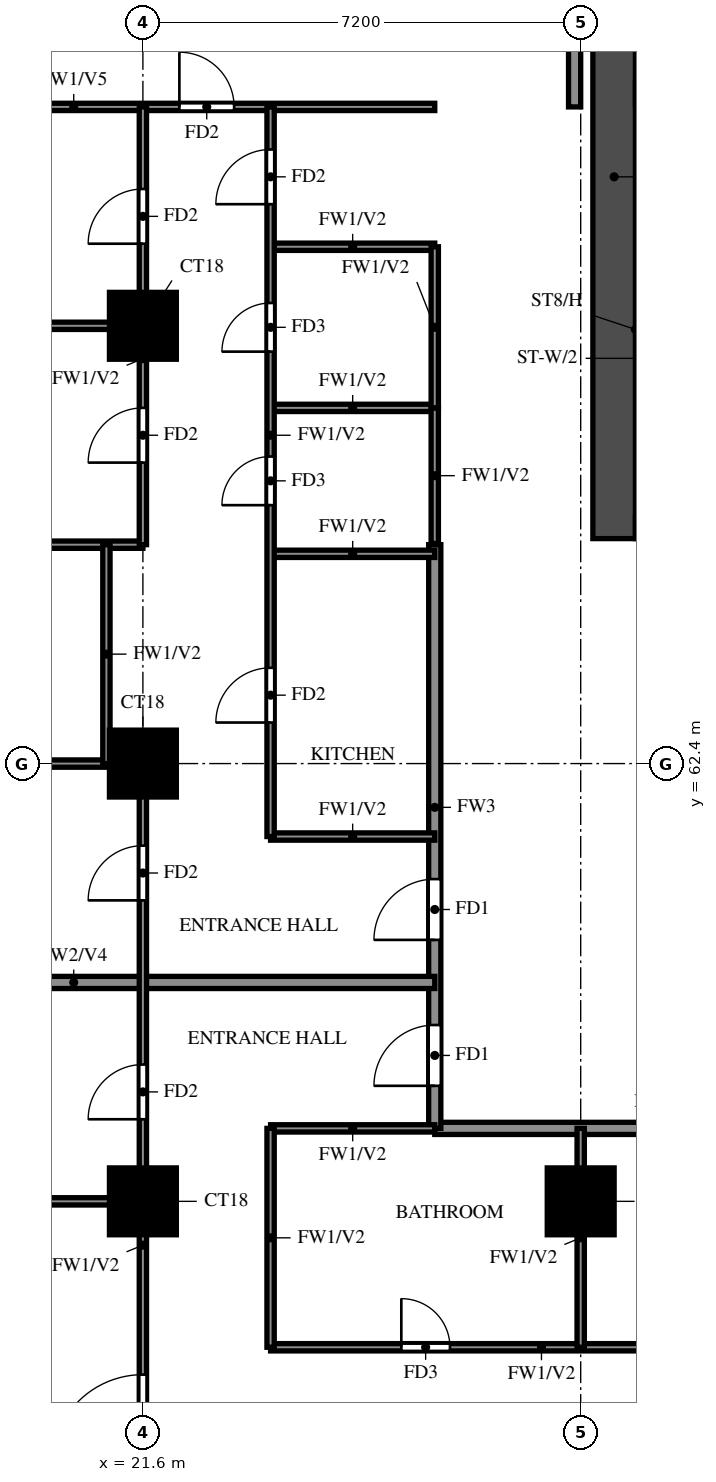
"""IFC4 building model, lengths in metres.
Left out: names, types, materials, properties, quantities, classifications, styles, units other than length and angle.
Written with IfcOpenShell. Run it as: python <this file> out.ifc"""

import sys

from ifc_helpers import new_model, si_unit, direction, frame, frame_2d, origin, origin_2d, place, context, subcontext, project, spatial, rectangle, extrude, source, transform, mapped, element, fill, save


model = new_model("IFC4")
c1 = context("Model", 3, precision=1e-05, world=origin(), true_north=direction((0.0, 1.0)))
c2 = subcontext(c1, "Body", "Model", "MODEL_VIEW")
j1 = project(units=[si_unit("LENGTHUNIT", "METRE"), si_unit("PLANEANGLEUNIT", "RADIAN")], contexts=[c1])
p1 = place(None, origin())
s1 = spatial("IfcSite", under=j1, at=p1, CompositionType="ELEMENT")
p2 = place(p1, origin())
s2 = spatial("IfcBuilding", under=s1, at=p2, CompositionType="ELEMENT")
p3 = place(p2, frame((0.0, 0.0, 123.5)))
s3 = spatial("IfcBuildingStorey", under=s2, at=p3, CompositionType="ELEMENT", Elevation=123.5)
m1 = source(origin(), c2, "Body", "SweptSolid", [
    extrude(rectangle(XDim=1.1, YDim=1.1, at=origin_2d()), origin(), (0.0, 0.0, 1.0), 3.2),
])
for number, where, z_axis, x_axis in (
    (1, (21.6, 55.2, 0.0), (0.0, 0.0, 1.0), (1.0, 0.0, 0.0)),
    (2, (28.8, 55.2, 0.0), (0.0, 0.0, 1.0), (1.0, 0.0, 0.0)),
    (3, (21.6, 62.4, 0.0), (0.0, 0.0, 1.0), (1.0, 0.0, 0.0)),
    (4, (21.6, 69.6, 0.0), (0.0, 0.0, 1.0), (1.0, 0.0, 0.0)),
):
    element("IfcColumn", number, at=place(p3, frame(where, z_axis=z_axis, x_axis=x_axis)), inside=s3, PredefinedType="COLUMN", context=c2, shape_type="MappedRepresentation", body=[
        mapped(m1, transform((0.0, 0.0, 0.0))),
    ])
p4 = place(p3, frame((29.35, 66.1, 0.0), z_axis=(0.0, 0.0, 1.0), x_axis=(0.0, 1.0, 0.0)))
e5 = element("IfcWall", 5, at=p4, inside=s3, PredefinedType="SHEAR", context=c2, shape_type="SweptSolid", body=[
    extrude(rectangle(XDim=11.9, YDim=0.7, at=frame_2d((5.95, 0.0))), origin(), (0.0, 0.0, 1.0), 3.2),
])
p5 = place(p3, frame((26.4, 56.4, 0.0), z_axis=(0.0, 0.0, 1.0), x_axis=(1.0, 0.0, 0.0)))
e6 = element("IfcWall", 6, at=p5, inside=s3, PredefinedType="SOLIDWALL", context=c2, shape_type="SweptSolid", body=[
    extrude(rectangle(XDim=7.2, YDim=0.2, at=frame_2d((3.6, 0.0))), origin(), (0.0, 0.0, 1.0), 3.2),
])
p6 = place(p3, frame((26.4, 56.4, 0.0), z_axis=(0.0, 0.0, 1.0), x_axis=(0.0, 1.0, 0.0)))
e7 = element("IfcWall", 7, at=p6, inside=s3, PredefinedType="SOLIDWALL", context=c2, shape_type="SweptSolid", body=[
    extrude(rectangle(XDim=9.6, YDim=0.2, at=frame_2d((4.8, 0.0))), origin(), (0.0, 0.0, 1.0), 3.2),
])
p7 = place(p6, frame((0.7, 0.0, 0.0)))
e8 = element("IfcOpeningElement", 8, at=p7, cuts=e7, PredefinedType="OPENING", context=c2, shape_type="SweptSolid", body=[
    extrude(rectangle(XDim=1.0, YDim=2.1, at=frame_2d((0.5, 1.05))), frame((0.0, 0.11, 0.0), z_axis=(0.0, -1.0, 0.0), x_axis=(1.0, 0.0, 0.0)), (0.0, 0.0, 1.0), 0.22),
])
p8 = place(p6, frame((3.1, 0.0, 0.0)))
e9 = element("IfcOpeningElement", 9, at=p8, cuts=e7, PredefinedType="OPENING", context=c2, shape_type="SweptSolid", body=[
    extrude(rectangle(XDim=1.0, YDim=2.1, at=frame_2d((0.5, 1.05))), frame((0.0, 0.11, 0.0), z_axis=(0.0, -1.0, 0.0), x_axis=(1.0, 0.0, 0.0)), (0.0, 0.0, 1.0), 0.22),
])
p9 = place(p3, frame((28.7, 73.2, 0.0), z_axis=(0.0, 0.0, 1.0), x_axis=(0.0, 1.0, 0.0)))
e10 = element("IfcWall", 10, at=p9, inside=s3, PredefinedType="SOLIDWALL", context=c2, shape_type="SweptSolid", body=[
    extrude(rectangle(XDim=4.8, YDim=0.2, at=frame_2d((2.4, 0.0))), origin(), (0.0, 0.0, 1.0), 3.2),
])
p10 = place(p3, frame((14.525, 58.8, 0.0), z_axis=(0.0, 0.0, 1.0), x_axis=(1.0, 0.0, 0.0)))
e11 = element("IfcWall", 11, at=p10, inside=s3, PredefinedType="SOLIDWALL", context=c2, shape_type="SweptSolid", body=[
    extrude(rectangle(XDim=11.875, YDim=0.2, at=frame_2d((5.938, 0.0))), origin(), (0.0, 0.0, 1.0), 2.3),
])
p11 = place(p3, frame((23.7, 52.8, 0.0), z_axis=(0.0, 0.0, 1.0), x_axis=(1.0, 0.0, 0.0)))
e12 = element("IfcWall", 12, at=p11, inside=s3, PredefinedType="PARTITIONING", context=c2, shape_type="SweptSolid", body=[
    extrude(rectangle(XDim=9.9, YDim=0.12, at=frame_2d((4.95, 0.0))), origin(), (0.0, 0.0, 1.0), 3.2),
])
p12 = place(p11, frame((2.15, 0.0, 0.0)))
e13 = element("IfcOpeningElement", 13, at=p12, cuts=e12, PredefinedType="OPENING", context=c2, shape_type="SweptSolid", body=[
    extrude(rectangle(XDim=0.8, YDim=2.1, at=frame_2d((0.4, 1.05))), frame((0.0, 0.07, 0.0), z_axis=(0.0, -1.0, 0.0), x_axis=(1.0, 0.0, 0.0)), (0.0, 0.0, 1.0), 0.14),
])
p13 = place(p11, frame((7.05, 0.0, 0.0)))
e14 = element("IfcOpeningElement", 14, at=p13, cuts=e12, PredefinedType="OPENING", context=c2, shape_type="SweptSolid", body=[
    extrude(rectangle(XDim=0.9, YDim=2.1, at=frame_2d((0.45, 1.05))), frame((0.0, 0.07, 0.0), z_axis=(0.0, -1.0, 0.0), x_axis=(1.0, 0.0, 0.0)), (0.0, 0.0, 1.0), 0.14),
])
p14 = place(p3, frame((14.525, 55.2, 0.0), z_axis=(0.0, 0.0, 1.0), x_axis=(1.0, 0.0, 0.0)))
e15 = element("IfcWall", 15, at=p14, inside=s3, PredefinedType="PARTITIONING", context=c2, shape_type="SweptSolid", body=[
    extrude(rectangle(XDim=7.075, YDim=0.12, at=frame_2d((3.538, 0.0))), origin(), (0.0, 0.0, 1.0), 3.2),
])
for number, where, z_axis, x_axis in (
    (16, (23.7, 56.4, 0.0), (0.0, 0.0, 1.0), (1.0, 0.0, 0.0)),
    (17, (23.7, 61.2, 0.0), (0.0, 0.0, 1.0), (1.0, 0.0, 0.0)),
):
    element("IfcWall", number, at=place(p3, frame(where, z_axis=z_axis, x_axis=x_axis)), inside=s3, PredefinedType="PARTITIONING", context=c2, shape_type="SweptSolid", body=[
        extrude(rectangle(XDim=2.7, YDim=0.12, at=frame_2d((1.35, 0.0))), origin(), (0.0, 0.0, 1.0), 3.2),
    ])
p15 = place(p3, frame((14.525, 62.4, 0.0), z_axis=(0.0, 0.0, 1.0), x_axis=(1.0, 0.0, 0.0)))
e18 = element("IfcWall", 18, at=p15, inside=s3, PredefinedType="PARTITIONING", context=c2, shape_type="SweptSolid", body=[
    extrude(rectangle(XDim=7.075, YDim=0.12, at=frame_2d((3.538, 0.0))), origin(), (0.0, 0.0, 1.0), 3.2),
])
p16 = place(p15, frame((2.837, 0.0, 0.0)))
e19 = element("IfcOpeningElement", 19, at=p16, cuts=e18, PredefinedType="OPENING", context=c2, shape_type="SweptSolid", body=[
    extrude(rectangle(XDim=0.8, YDim=2.1, at=frame_2d((0.4, 1.05))), frame((0.0, 0.07, 0.0), z_axis=(0.0, -1.0, 0.0), x_axis=(1.0, 0.0, 0.0)), (0.0, 0.0, 1.0), 0.14),
])
p17 = place(p3, frame((23.7, 65.85, 0.0), z_axis=(0.0, 0.0, 1.0), x_axis=(1.0, 0.0, 0.0)))
e20 = element("IfcWall", 20, at=p17, inside=s3, PredefinedType="PARTITIONING", context=c2, shape_type="SweptSolid", body=[
    extrude(rectangle(XDim=2.7, YDim=0.12, at=frame_2d((1.35, 0.0))), origin(), (0.0, 0.0, 1.0), 3.2),
])
p18 = place(p3, frame((14.525, 66.0, 0.0), z_axis=(0.0, 0.0, 1.0), x_axis=(1.0, 0.0, 0.0)))
e21 = element("IfcWall", 21, at=p18, inside=s3, PredefinedType="PARTITIONING", context=c2, shape_type="SweptSolid", body=[
    extrude(rectangle(XDim=7.075, YDim=0.12, at=frame_2d((3.538, 0.0))), origin(), (0.0, 0.0, 1.0), 2.3),
])
p19 = place(p3, frame((23.7, 68.25, 0.0), z_axis=(0.0, 0.0, 1.0), x_axis=(1.0, 0.0, 0.0)))
e22 = element("IfcWall", 22, at=p19, inside=s3, PredefinedType="PARTITIONING", context=c2, shape_type="SweptSolid", body=[
    extrude(rectangle(XDim=2.7, YDim=0.12, at=frame_2d((1.35, 0.0))), origin(), (0.0, 0.0, 1.0), 3.2),
])
p20 = place(p3, frame((14.525, 69.6, 0.0), z_axis=(0.0, 0.0, 1.0), x_axis=(1.0, 0.0, 0.0)))
e23 = element("IfcWall", 23, at=p20, inside=s3, PredefinedType="PARTITIONING", context=c2, shape_type="SweptSolid", body=[
    extrude(rectangle(XDim=7.075, YDim=0.12, at=frame_2d((3.538, 0.0))), origin(), (0.0, 0.0, 1.0), 3.2),
])
p21 = place(p3, frame((23.7, 70.9, 0.0), z_axis=(0.0, 0.0, 1.0), x_axis=(1.0, 0.0, 0.0)))
e24 = element("IfcWall", 24, at=p21, inside=s3, PredefinedType="PARTITIONING", context=c2, shape_type="SweptSolid", body=[
    extrude(rectangle(XDim=2.7, YDim=0.12, at=frame_2d((1.35, 0.0))), origin(), (0.0, 0.0, 1.0), 3.2),
])
p22 = place(p3, frame((14.525, 73.2, 0.0), z_axis=(0.0, 0.0, 1.0), x_axis=(1.0, 0.0, 0.0)))
e25 = element("IfcWall", 25, at=p22, inside=s3, PredefinedType="PARTITIONING", context=c2, shape_type="SweptSolid", body=[
    extrude(rectangle(XDim=11.875, YDim=0.12, at=frame_2d((5.938, 0.0))), origin(), (0.0, 0.0, 1.0), 2.3),
])
p23 = place(p22, frame((7.675, 0.0, 0.0)))
e26 = element("IfcOpeningElement", 26, at=p23, cuts=e25, PredefinedType="OPENING", context=c2, shape_type="SweptSolid", body=[
    extrude(rectangle(XDim=0.9, YDim=2.1, at=frame_2d((0.45, 1.05))), frame((0.0, 0.07, 0.0), z_axis=(0.0, -1.0, 0.0), x_axis=(1.0, 0.0, 0.0)), (0.0, 0.0, 1.0), 0.14),
])
p24 = place(p3, frame((21.0, 62.4, 0.0), z_axis=(0.0, 0.0, 1.0), x_axis=(0.0, 1.0, 0.0)))
e27 = element("IfcWall", 27, at=p24, inside=s3, PredefinedType="PARTITIONING", context=c2, shape_type="SweptSolid", body=[
    extrude(rectangle(XDim=3.6, YDim=0.12, at=frame_2d((1.8, 0.0))), origin(), (0.0, 0.0, 1.0), 3.2),
])
p25 = place(p3, frame((21.6, 48.0, 0.0), z_axis=(0.0, 0.0, 1.0), x_axis=(0.0, 1.0, 0.0)))
e28 = element("IfcWall", 28, at=p25, inside=s3, PredefinedType="PARTITIONING", context=c2, shape_type="SweptSolid", body=[
    extrude(rectangle(XDim=14.4, YDim=0.12, at=frame_2d((7.2, 0.0))), origin(), (0.0, 0.0, 1.0), 3.2),
])
p26 = place(p25, frame((2.85, 0.0, 0.0)))
e29 = element("IfcOpeningElement", 29, at=p26, cuts=e28, PredefinedType="OPENING", context=c2, shape_type="SweptSolid", body=[
    extrude(rectangle(XDim=1.5, YDim=2.1, at=frame_2d((0.75, 1.05))), frame((0.0, 0.07, 0.0), z_axis=(0.0, -1.0, 0.0), x_axis=(1.0, 0.0, 0.0)), (0.0, 0.0, 1.0), 0.14),
])
p27 = place(p25, frame((8.55, 0.0, 0.0)))
e30 = element("IfcOpeningElement", 30, at=p27, cuts=e28, PredefinedType="OPENING", context=c2, shape_type="SweptSolid", body=[
    extrude(rectangle(XDim=0.9, YDim=2.1, at=frame_2d((0.45, 1.05))), frame((0.0, 0.07, 0.0), z_axis=(0.0, -1.0, 0.0), x_axis=(1.0, 0.0, 0.0)), (0.0, 0.0, 1.0), 0.14),
])
p28 = place(p25, frame((12.15, 0.0, 0.0)))
e31 = element("IfcOpeningElement", 31, at=p28, cuts=e28, PredefinedType="OPENING", context=c2, shape_type="SweptSolid", body=[
    extrude(rectangle(XDim=0.9, YDim=2.1, at=frame_2d((0.45, 1.05))), frame((0.0, 0.07, 0.0), z_axis=(0.0, -1.0, 0.0), x_axis=(1.0, 0.0, 0.0)), (0.0, 0.0, 1.0), 0.14),
])
p29 = place(p3, frame((21.6, 66.0, 0.0), z_axis=(0.0, 0.0, 1.0), x_axis=(0.0, 1.0, 0.0)))
e32 = element("IfcWall", 32, at=p29, inside=s3, PredefinedType="PARTITIONING", context=c2, shape_type="SweptSolid", body=[
    extrude(rectangle(XDim=7.2, YDim=0.12, at=frame_2d((3.6, 0.0))), origin(), (0.0, 0.0, 1.0), 3.2),
])
p30 = place(p29, frame((1.35, 0.0, 0.0)))
e33 = element("IfcOpeningElement", 33, at=p30, cuts=e32, PredefinedType="OPENING", context=c2, shape_type="SweptSolid", body=[
    extrude(rectangle(XDim=0.9, YDim=2.1, at=frame_2d((0.45, 1.05))), frame((0.0, 0.07, 0.0), z_axis=(0.0, -1.0, 0.0), x_axis=(1.0, 0.0, 0.0)), (0.0, 0.0, 1.0), 0.14),
])
p31 = place(p29, frame((4.95, 0.0, 0.0)))
e34 = element("IfcOpeningElement", 34, at=p31, cuts=e32, PredefinedType="OPENING", context=c2, shape_type="SweptSolid", body=[
    extrude(rectangle(XDim=0.9, YDim=2.1, at=frame_2d((0.45, 1.05))), frame((0.0, 0.07, 0.0), z_axis=(0.0, -1.0, 0.0), x_axis=(1.0, 0.0, 0.0)), (0.0, 0.0, 1.0), 0.14),
])
p32 = place(p3, frame((23.7, 52.8, 0.0), z_axis=(0.0, 0.0, 1.0), x_axis=(0.0, 1.0, 0.0)))
e35 = element("IfcWall", 35, at=p32, inside=s3, PredefinedType="PARTITIONING", context=c2, shape_type="SweptSolid", body=[
    extrude(rectangle(XDim=3.6, YDim=0.12, at=frame_2d((1.8, 0.0))), origin(), (0.0, 0.0, 1.0), 3.2),
])
p33 = place(p3, frame((23.7, 61.2, 0.0), z_axis=(0.0, 0.0, 1.0), x_axis=(0.0, 1.0, 0.0)))
e36 = element("IfcWall", 36, at=p33, inside=s3, PredefinedType="PARTITIONING", context=c2, shape_type="SweptSolid", body=[
    extrude(rectangle(XDim=12.0, YDim=0.12, at=frame_2d((6.0, 0.0))), origin(), (0.0, 0.0, 1.0), 3.2),
])
p34 = place(p33, frame((1.875, 0.0, 0.0)))
e37 = element("IfcOpeningElement", 37, at=p34, cuts=e36, PredefinedType="OPENING", context=c2, shape_type="SweptSolid", body=[
    extrude(rectangle(XDim=0.9, YDim=2.1, at=frame_2d((0.45, 1.05))), frame((0.0, 0.07, 0.0), z_axis=(0.0, -1.0, 0.0), x_axis=(1.0, 0.0, 0.0)), (0.0, 0.0, 1.0), 0.14),
])
p35 = place(p33, frame((5.45, 0.0, 0.0)))
e38 = element("IfcOpeningElement", 38, at=p35, cuts=e36, PredefinedType="OPENING", context=c2, shape_type="SweptSolid", body=[
    extrude(rectangle(XDim=0.8, YDim=2.1, at=frame_2d((0.4, 1.05))), frame((0.0, 0.07, 0.0), z_axis=(0.0, -1.0, 0.0), x_axis=(1.0, 0.0, 0.0)), (0.0, 0.0, 1.0), 0.14),
])
p36 = place(p33, frame((7.975, 0.0, 0.0)))
e39 = element("IfcOpeningElement", 39, at=p36, cuts=e36, PredefinedType="OPENING", context=c2, shape_type="SweptSolid", body=[
    extrude(rectangle(XDim=0.8, YDim=2.1, at=frame_2d((0.4, 1.05))), frame((0.0, 0.07, 0.0), z_axis=(0.0, -1.0, 0.0), x_axis=(1.0, 0.0, 0.0)), (0.0, 0.0, 1.0), 0.14),
])
p37 = place(p33, frame((10.4, 0.0, 0.0)))
e40 = element("IfcOpeningElement", 40, at=p37, cuts=e36, PredefinedType="OPENING", context=c2, shape_type="SweptSolid", body=[
    extrude(rectangle(XDim=0.9, YDim=2.1, at=frame_2d((0.45, 1.05))), frame((0.0, 0.07, 0.0), z_axis=(0.0, -1.0, 0.0), x_axis=(1.0, 0.0, 0.0)), (0.0, 0.0, 1.0), 0.14),
])
p38 = place(p3, frame((26.4, 66.02, 0.0), z_axis=(0.0, 0.0, 1.0), x_axis=(0.0, 1.0, 0.0)))
e41 = element("IfcWall", 41, at=p38, inside=s3, PredefinedType="PARTITIONING", context=c2, shape_type="SweptSolid", body=[
    extrude(rectangle(XDim=2.23, YDim=0.12, at=frame_2d((1.115, 0.0))), origin(), (0.0, 0.0, 1.0), 3.2),
])
p39 = place(p3, frame((26.4, 68.25, 0.0), z_axis=(0.0, 0.0, 1.0), x_axis=(0.0, 1.0, 0.0)))
e42 = element("IfcWall", 42, at=p39, inside=s3, PredefinedType="PARTITIONING", context=c2, shape_type="SweptSolid", body=[
    extrude(rectangle(XDim=2.65, YDim=0.12, at=frame_2d((1.325, 0.0))), origin(), (0.0, 0.0, 1.0), 3.2),
])
p40 = place(p3, frame((28.8, 52.8, 0.0), z_axis=(0.0, 0.0, 1.0), x_axis=(0.0, 1.0, 0.0)))
e43 = element("IfcWall", 43, at=p40, inside=s3, PredefinedType="PARTITIONING", context=c2, shape_type="SweptSolid", body=[
    extrude(rectangle(XDim=3.6, YDim=0.12, at=frame_2d((1.8, 0.0))), origin(), (0.0, 0.0, 1.0), 3.2),
])
p41 = place(p7, origin())
e44 = element("IfcDoor", 44, at=p41, inside=s3, OperationType="SINGLE_SWING_LEFT", PredefinedType="DOOR", context=c2, shape_type="SweptSolid", body=[
    extrude(rectangle(XDim=1.0, YDim=2.1, at=frame_2d((0.5, 1.05))), frame((0.0, 0.025, 0.0), z_axis=(0.0, -1.0, 0.0), x_axis=(1.0, 0.0, 0.0)), (0.0, 0.0, 1.0), 0.05),
])
fill(e8, e44)
p42 = place(p26, origin())
e45 = element("IfcDoor", 45, at=p42, inside=s3, OperationType="SINGLE_SWING_RIGHT", PredefinedType="DOOR", context=c2, shape_type="SweptSolid", body=[
    extrude(rectangle(XDim=1.5, YDim=2.1, at=frame_2d((0.75, 1.05))), frame((0.0, 0.025, 0.0), z_axis=(0.0, -1.0, 0.0), x_axis=(1.0, 0.0, 0.0)), (0.0, 0.0, 1.0), 0.05),
])
fill(e29, e45)
p43 = place(p27, origin())
e46 = element("IfcDoor", 46, at=p43, inside=s3, OperationType="SINGLE_SWING_LEFT", PredefinedType="DOOR", context=c2, shape_type="SweptSolid", body=[
    extrude(rectangle(XDim=0.9, YDim=2.1, at=frame_2d((0.45, 1.05))), frame((0.0, 0.025, 0.0), z_axis=(0.0, -1.0, 0.0), x_axis=(1.0, 0.0, 0.0)), (0.0, 0.0, 1.0), 0.05),
])
fill(e30, e46)
p44 = place(p12, origin())
e47 = element("IfcDoor", 47, at=p44, inside=s3, OperationType="SINGLE_SWING_RIGHT", PredefinedType="DOOR", context=c2, shape_type="SweptSolid", body=[
    extrude(rectangle(XDim=0.8, YDim=2.1, at=frame_2d((0.4, 1.05))), frame((0.0, 0.025, 0.0), z_axis=(0.0, -1.0, 0.0), x_axis=(1.0, 0.0, 0.0)), (0.0, 0.0, 1.0), 0.05),
])
fill(e13, e47)
p45 = place(p8, origin())
e48 = element("IfcDoor", 48, at=p45, inside=s3, OperationType="SINGLE_SWING_LEFT", PredefinedType="DOOR", context=c2, shape_type="SweptSolid", body=[
    extrude(rectangle(XDim=1.0, YDim=2.1, at=frame_2d((0.5, 1.05))), frame((0.0, 0.025, 0.0), z_axis=(0.0, -1.0, 0.0), x_axis=(1.0, 0.0, 0.0)), (0.0, 0.0, 1.0), 0.05),
])
fill(e9, e48)
p46 = place(p28, origin())
e49 = element("IfcDoor", 49, at=p46, inside=s3, OperationType="SINGLE_SWING_RIGHT", PredefinedType="DOOR", context=c2, shape_type="SweptSolid", body=[
    extrude(rectangle(XDim=0.9, YDim=2.1, at=frame_2d((0.45, 1.05))), frame((0.0, 0.025, 0.0), z_axis=(0.0, -1.0, 0.0), x_axis=(1.0, 0.0, 0.0)), (0.0, 0.0, 1.0), 0.05),
])
fill(e31, e49)
p47 = place(p30, origin())
e50 = element("IfcDoor", 50, at=p47, inside=s3, OperationType="SINGLE_SWING_LEFT", PredefinedType="DOOR", context=c2, shape_type="SweptSolid", body=[
    extrude(rectangle(XDim=0.9, YDim=2.1, at=frame_2d((0.45, 1.05))), frame((0.0, 0.025, 0.0), z_axis=(0.0, -1.0, 0.0), x_axis=(1.0, 0.0, 0.0)), (0.0, 0.0, 1.0), 0.05),
])
fill(e33, e50)
p48 = place(p31, origin())
e51 = element("IfcDoor", 51, at=p48, inside=s3, OperationType="SINGLE_SWING_RIGHT", PredefinedType="DOOR", context=c2, shape_type="SweptSolid", body=[
    extrude(rectangle(XDim=0.9, YDim=2.1, at=frame_2d((0.45, 1.05))), frame((0.0, 0.025, 0.0), z_axis=(0.0, -1.0, 0.0), x_axis=(1.0, 0.0, 0.0)), (0.0, 0.0, 1.0), 0.05),
])
fill(e34, e51)
p49 = place(p23, origin())
e52 = element("IfcDoor", 52, at=p49, inside=s3, OperationType="SINGLE_SWING_LEFT", PredefinedType="DOOR", context=c2, shape_type="SweptSolid", body=[
    extrude(rectangle(XDim=0.9, YDim=2.1, at=frame_2d((0.45, 1.05))), frame((0.0, 0.025, 0.0), z_axis=(0.0, -1.0, 0.0), x_axis=(1.0, 0.0, 0.0)), (0.0, 0.0, 1.0), 0.05),
])
fill(e26, e52)
p50 = place(p34, origin())
e53 = element("IfcDoor", 53, at=p50, inside=s3, OperationType="SINGLE_SWING_LEFT", PredefinedType="DOOR", context=c2, shape_type="SweptSolid", body=[
    extrude(rectangle(XDim=0.9, YDim=2.1, at=frame_2d((0.45, 1.05))), frame((0.0, 0.025, 0.0), z_axis=(0.0, -1.0, 0.0), x_axis=(1.0, 0.0, 0.0)), (0.0, 0.0, 1.0), 0.05),
])
fill(e37, e53)
p51 = place(p35, origin())
e54 = element("IfcDoor", 54, at=p51, inside=s3, OperationType="SINGLE_SWING_RIGHT", PredefinedType="DOOR", context=c2, shape_type="SweptSolid", body=[
    extrude(rectangle(XDim=0.8, YDim=2.1, at=frame_2d((0.4, 1.05))), frame((0.0, 0.025, 0.0), z_axis=(0.0, -1.0, 0.0), x_axis=(1.0, 0.0, 0.0)), (0.0, 0.0, 1.0), 0.05),
])
fill(e38, e54)
p52 = place(p36, origin())
e55 = element("IfcDoor", 55, at=p52, inside=s3, OperationType="SINGLE_SWING_LEFT", PredefinedType="DOOR", context=c2, shape_type="SweptSolid", body=[
    extrude(rectangle(XDim=0.8, YDim=2.1, at=frame_2d((0.4, 1.05))), frame((0.0, 0.025, 0.0), z_axis=(0.0, -1.0, 0.0), x_axis=(1.0, 0.0, 0.0)), (0.0, 0.0, 1.0), 0.05),
])
fill(e39, e55)
p53 = place(p37, origin())
e56 = element("IfcDoor", 56, at=p53, inside=s3, OperationType="SINGLE_SWING_LEFT", PredefinedType="DOOR", context=c2, shape_type="SweptSolid", body=[
    extrude(rectangle(XDim=0.9, YDim=2.1, at=frame_2d((0.45, 1.05))), frame((0.0, 0.025, 0.0), z_axis=(0.0, -1.0, 0.0), x_axis=(1.0, 0.0, 0.0)), (0.0, 0.0, 1.0), 0.05),
])
fill(e40, e56)
save(model, sys.argv[1])
